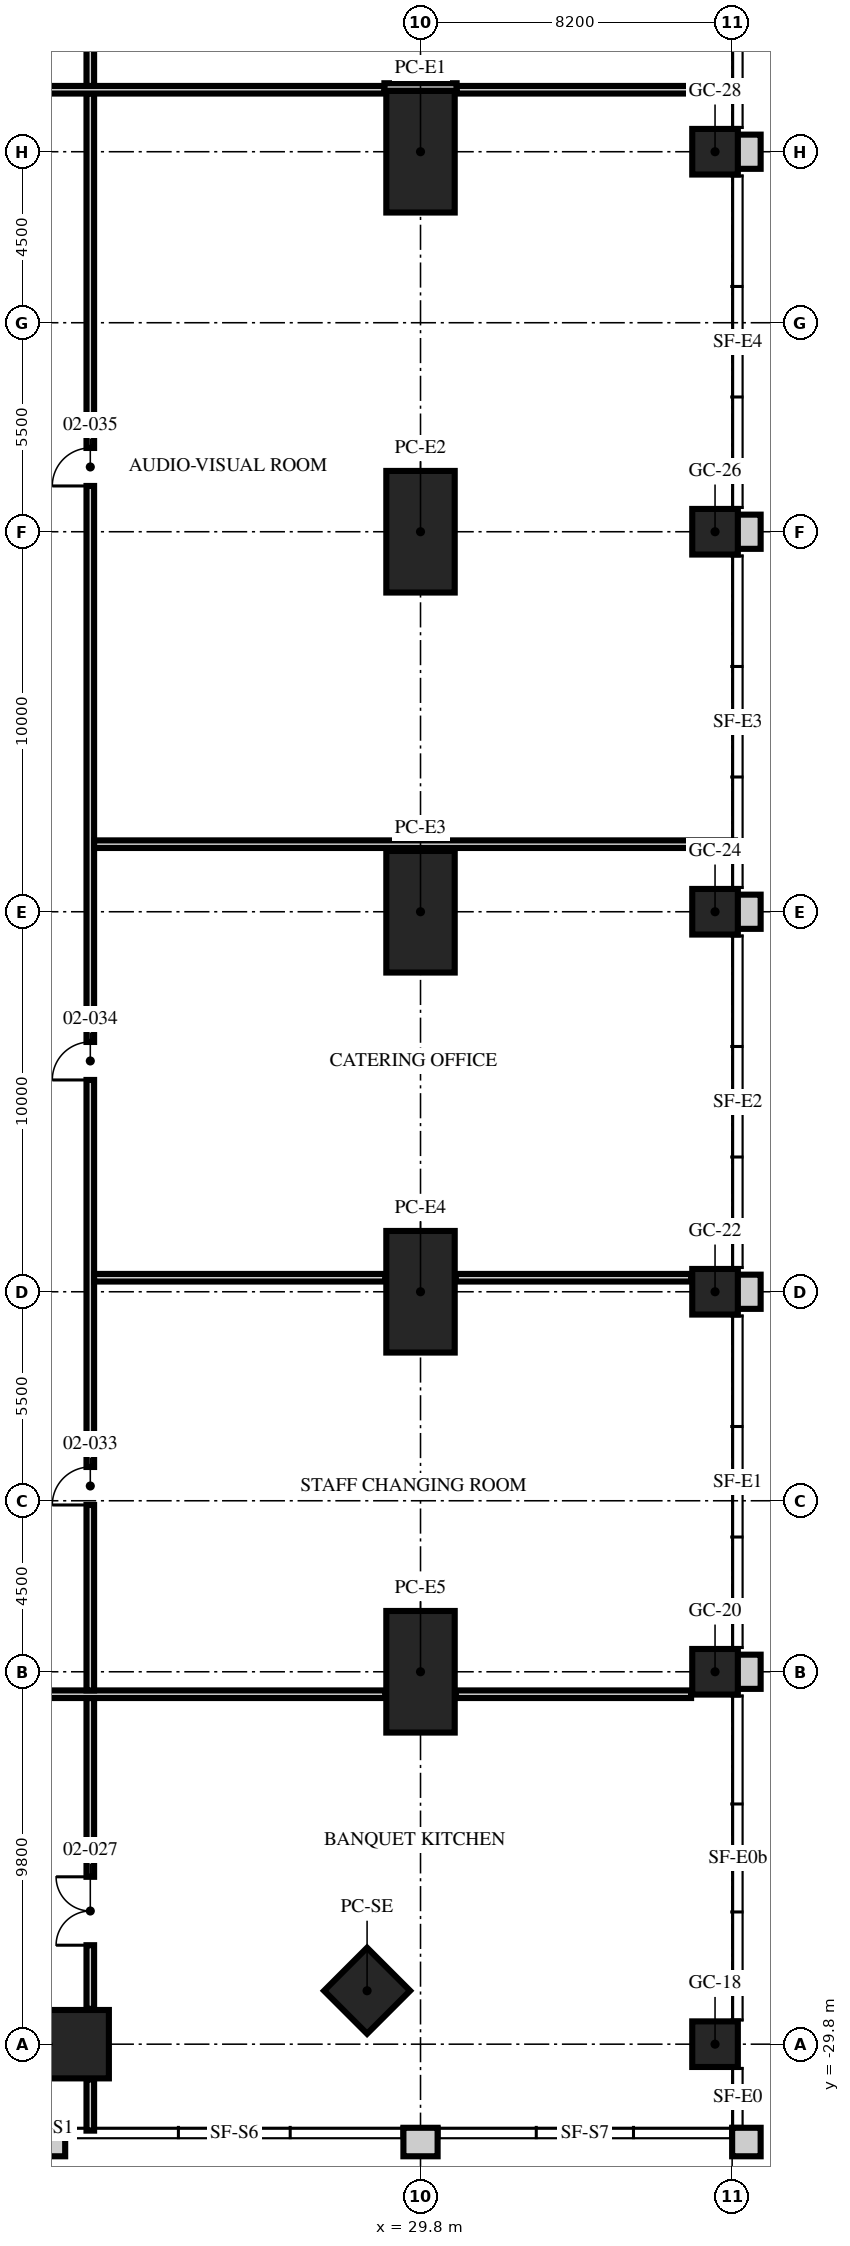
"""IFC4 building model, lengths in metres.
Left out: names, types, materials, properties, quantities, classifications, styles, units other than length and angle.
Written with IfcOpenShell. Run it as: python <this file> out.ifc"""

import sys

from ifc_helpers import new_model, si_unit, direction, frame, frame_2d, origin, origin_2d, place, context, subcontext, project, spatial, rectangle, hollow_rectangle, extrude, element, fill, save


model = new_model("IFC4")
c1 = context("Model", 3, precision=1e-05, world=origin(), true_north=direction((0.0, 1.0)))
c2 = subcontext(c1, "Body", "Model", "MODEL_VIEW")
j1 = project(units=[si_unit("LENGTHUNIT", "METRE"), si_unit("PLANEANGLEUNIT", "RADIAN")], contexts=[c1])
p1 = place(None, origin())
s1 = spatial("IfcSite", under=j1, at=p1, CompositionType="ELEMENT")
p2 = place(p1, origin())
s2 = spatial("IfcBuilding", under=s1, at=p2, CompositionType="ELEMENT")
p3 = place(p2, frame((0.0, 0.0, 11.0)))
s3 = spatial("IfcBuildingStorey", under=s2, at=p3, CompositionType="ELEMENT", Elevation=11.0)
for number, where, z_axis, x_axis in (
    (1, (29.8, 20.0, 0.0), (0.0, 0.0, 1.0), (0.0, 1.0, 0.0)),
    (2, (29.8, 10.0, 0.0), (0.0, 0.0, 1.0), (0.0, 1.0, 0.0)),
    (3, (29.8, 0.0, 0.0), (0.0, 0.0, 1.0), (0.0, 1.0, 0.0)),
    (4, (29.8, -10.0, 0.0), (0.0, 0.0, 1.0), (0.0, 1.0, 0.0)),
    (5, (29.8, -20.0, 0.0), (0.0, 0.0, 1.0), (0.0, 1.0, 0.0)),
    (6, (20.0, -29.8, 0.0), (0.0, 0.0, 1.0), (1.0, 0.0, 0.0)),
):
    element("IfcColumn", number, at=place(p3, frame(where, z_axis=z_axis, x_axis=x_axis)), inside=s3, PredefinedType="COLUMN", context=c2, shape_type="SweptSolid", body=[
        extrude(hollow_rectangle(XDim=3.2, YDim=1.8, WallThickness=0.2, at=origin_2d()), origin(), (0.0, 0.0, 1.0), 5.0),
    ])
p4 = place(p3, frame((28.394, -28.394, 0.0), z_axis=(0.0, 0.0, 1.0), x_axis=(0.707106781187, 0.707106781187, 0.0)))
e7 = element("IfcColumn", 7, at=p4, inside=s3, PredefinedType="COLUMN", context=c2, shape_type="SweptSolid", body=[
    extrude(hollow_rectangle(XDim=1.6, YDim=1.6, WallThickness=0.1, at=origin_2d()), origin(), (0.0, 0.0, 1.0), 5.0),
])
for number, where, z_axis, x_axis in (
    (8, (37.55, -29.8, 0.0), (0.0, 0.0, 1.0), (1.0, 0.0, 0.0)),
    (9, (37.55, -20.0, 0.0), (0.0, 0.0, 1.0), (1.0, 0.0, 0.0)),
    (10, (37.55, -10.0, 0.0), (0.0, 0.0, 1.0), (1.0, 0.0, 0.0)),
    (11, (37.55, 0.0, 0.0), (0.0, 0.0, 1.0), (1.0, 0.0, 0.0)),
    (12, (37.55, 10.0, 0.0), (0.0, 0.0, 1.0), (1.0, 0.0, 0.0)),
    (13, (37.55, 20.0, 0.0), (0.0, 0.0, 1.0), (1.0, 0.0, 0.0)),
):
    element("IfcColumn", number, at=place(p3, frame(where, z_axis=z_axis, x_axis=x_axis)), inside=s3, PredefinedType="COLUMN", context=c2, shape_type="SweptSolid", body=[
        extrude(rectangle(XDim=1.2, YDim=1.2, at=origin_2d()), origin(), (0.0, 0.0, 1.0), 5.0),
    ])
for number, where, z_axis, x_axis in (
    (14, (19.55, -32.375, 0.0), (0.0, 0.0, 1.0), (1.0, 0.0, 0.0)),
    (15, (29.35, -32.375, 0.0), (0.0, 0.0, 1.0), (1.0, 0.0, 0.0)),
):
    element("IfcWall", number, at=place(p3, frame(where, z_axis=z_axis, x_axis=x_axis)), inside=s3, PredefinedType="SOLIDWALL", context=c2, shape_type="SweptSolid", body=[
        extrude(rectangle(XDim=0.9, YDim=0.75, at=frame_2d((0.45, 0.0))), origin(), (0.0, 0.0, 1.0), 5.0),
    ])
p5 = place(p3, frame((38.0, -32.375, 0.0), z_axis=(0.0, 0.0, 1.0), x_axis=(1.0, 0.0, 0.0)))
e16 = element("IfcWall", 16, at=p5, inside=s3, PredefinedType="SOLIDWALL", context=c2, shape_type="SweptSolid", body=[
    extrude(rectangle(XDim=0.75, YDim=0.75, at=frame_2d((0.375, 0.0))), origin(), (0.0, 0.0, 1.0), 5.0),
])
for number, where, z_axis, x_axis in (
    (17, (38.375, -20.45, 0.0), (0.0, 0.0, 1.0), (0.0, 1.0, 0.0)),
    (18, (38.375, -10.45, 0.0), (0.0, 0.0, 1.0), (0.0, 1.0, 0.0)),
    (19, (38.375, -0.45, 0.0), (0.0, 0.0, 1.0), (0.0, 1.0, 0.0)),
    (20, (38.375, 9.55, 0.0), (0.0, 0.0, 1.0), (0.0, 1.0, 0.0)),
    (21, (38.375, 19.55, 0.0), (0.0, 0.0, 1.0), (0.0, 1.0, 0.0)),
):
    element("IfcWall", number, at=place(p3, frame(where, z_axis=z_axis, x_axis=x_axis)), inside=s3, PredefinedType="SOLIDWALL", context=c2, shape_type="SweptSolid", body=[
        extrude(rectangle(XDim=0.9, YDim=0.75, at=frame_2d((0.45, 0.0))), origin(), (0.0, 0.0, 1.0), 5.0),
    ])
p6 = place(p3, frame((21.111, -32.075, 0.0), z_axis=(0.0, 0.0, 1.0), x_axis=(0.0, 1.0, 0.0)))
e22 = element("IfcWall", 22, at=p6, inside=s3, PredefinedType="SOLIDWALL", context=c2, shape_type="SweptSolid", body=[
    extrude(rectangle(XDim=1.345, YDim=0.2, at=frame_2d((0.672, 0.0))), origin(), (0.0, 0.0, 1.0), 4.7),
])
p7 = place(p3, frame((21.111, -28.87, 0.0), z_axis=(0.0, 0.0, 1.0), x_axis=(0.0, 1.0, 0.0)))
e23 = element("IfcWall", 23, at=p7, inside=s3, PredefinedType="SOLIDWALL", context=c2, shape_type="SweptSolid", body=[
    extrude(rectangle(XDim=8.179, YDim=0.2, at=frame_2d((4.089, 0.0))), origin(), (0.0, 0.0, 1.0), 3.5),
])
p8 = place(p7, frame((1.674, 0.0, 0.0)))
e24 = element("IfcOpeningElement", 24, at=p8, cuts=e23, PredefinedType="OPENING", context=c2, shape_type="SweptSolid", body=[
    extrude(rectangle(XDim=1.8, YDim=2.4, at=frame_2d((0.9, 1.2))), frame((0.0, 0.11, 0.0), z_axis=(0.0, -1.0, 0.0), x_axis=(1.0, 0.0, 0.0)), (0.0, 0.0, 1.0), 0.22),
])
p9 = place(p3, frame((-28.87, -20.591, 0.0), z_axis=(0.0, 0.0, 1.0), x_axis=(1.0, 0.0, 0.0)))
e25 = element("IfcWall", 25, at=p9, inside=s3, PredefinedType="SOLIDWALL", context=c2, shape_type="SweptSolid", body=[
    extrude(rectangle(XDim=57.74, YDim=0.2, at=frame_2d((28.87, 0.0))), origin(), (0.0, 0.0, 1.0), 3.5),
])
p10 = place(p9, frame((11.091, 0.0, 0.0)))
e26 = element("IfcOpeningElement", 26, at=p10, cuts=e25, PredefinedType="OPENING", context=c2, shape_type="SweptSolid", body=[
    extrude(rectangle(XDim=1.8, YDim=2.4, at=frame_2d((0.9, 1.2))), frame((0.0, 0.11, 0.0), z_axis=(0.0, -1.0, 0.0), x_axis=(1.0, 0.0, 0.0)), (0.0, 0.0, 1.0), 0.22),
])
p11 = place(p9, frame((32.202, 0.0, 0.0)))
e27 = element("IfcOpeningElement", 27, at=p11, cuts=e25, PredefinedType="OPENING", context=c2, shape_type="SweptSolid", body=[
    extrude(rectangle(XDim=1.8, YDim=2.4, at=frame_2d((0.9, 1.2))), frame((0.0, 0.11, 0.0), z_axis=(0.0, -1.0, 0.0), x_axis=(1.0, 0.0, 0.0)), (0.0, 0.0, 1.0), 0.22),
])
p12 = place(p3, frame((30.73, -20.591, 0.0), z_axis=(0.0, 0.0, 1.0), x_axis=(1.0, 0.0, 0.0)))
e28 = element("IfcWall", 28, at=p12, inside=s3, PredefinedType="SOLIDWALL", context=c2, shape_type="SweptSolid", body=[
    extrude(rectangle(XDim=6.19, YDim=0.2, at=frame_2d((3.095, 0.0))), origin(), (0.0, 0.0, 1.0), 3.7),
])
p13 = place(p3, frame((21.111, -20.491, 0.0), z_axis=(0.0, 0.0, 1.0), x_axis=(0.0, 1.0, 0.0)))
e29 = element("IfcWall", 29, at=p13, inside=s3, PredefinedType="SOLIDWALL", context=c2, shape_type="SweptSolid", body=[
    extrude(rectangle(XDim=42.022, YDim=0.2, at=frame_2d((21.011, 0.0))), origin(), (0.0, 0.0, 1.0), 3.5),
])
p14 = place(p13, frame((4.88, 0.0, 0.0)))
e30 = element("IfcOpeningElement", 30, at=p14, cuts=e29, PredefinedType="OPENING", context=c2, shape_type="SweptSolid", body=[
    extrude(rectangle(XDim=1.0, YDim=2.1, at=frame_2d((0.5, 1.05))), frame((0.0, 0.11, 0.0), z_axis=(0.0, -1.0, 0.0), x_axis=(1.0, 0.0, 0.0)), (0.0, 0.0, 1.0), 0.22),
])
p15 = place(p13, frame((16.064, 0.0, 0.0)))
e31 = element("IfcOpeningElement", 31, at=p15, cuts=e29, PredefinedType="OPENING", context=c2, shape_type="SweptSolid", body=[
    extrude(rectangle(XDim=1.0, YDim=2.1, at=frame_2d((0.5, 1.05))), frame((0.0, 0.11, 0.0), z_axis=(0.0, -1.0, 0.0), x_axis=(1.0, 0.0, 0.0)), (0.0, 0.0, 1.0), 0.22),
])
p16 = place(p13, frame((31.696, 0.0, 0.0)))
e32 = element("IfcOpeningElement", 32, at=p16, cuts=e29, PredefinedType="OPENING", context=c2, shape_type="SweptSolid", body=[
    extrude(rectangle(XDim=1.0, YDim=2.1, at=frame_2d((0.5, 1.05))), frame((0.0, 0.11, 0.0), z_axis=(0.0, -1.0, 0.0), x_axis=(1.0, 0.0, 0.0)), (0.0, 0.0, 1.0), 0.22),
])
p17 = place(p3, frame((21.211, -9.631, 0.0), z_axis=(0.0, 0.0, 1.0), x_axis=(1.0, 0.0, 0.0)))
e33 = element("IfcWall", 33, at=p17, inside=s3, PredefinedType="SOLIDWALL", context=c2, shape_type="SweptSolid", body=[
    extrude(rectangle(XDim=7.659, YDim=0.2, at=frame_2d((3.83, 0.0))), origin(), (0.0, 0.0, 1.0), 4.7),
])
p18 = place(p3, frame((30.73, -9.631, 0.0), z_axis=(0.0, 0.0, 1.0), x_axis=(1.0, 0.0, 0.0)))
e34 = element("IfcWall", 34, at=p18, inside=s3, PredefinedType="SOLIDWALL", context=c2, shape_type="SweptSolid", body=[
    extrude(rectangle(XDim=6.19, YDim=0.2, at=frame_2d((3.095, 0.0))), origin(), (0.0, 0.0, 1.0), 3.7),
])
p19 = place(p3, frame((21.211, 1.778, 0.0), z_axis=(0.0, 0.0, 1.0), x_axis=(1.0, 0.0, 0.0)))
e35 = element("IfcWall", 35, at=p19, inside=s3, PredefinedType="SOLIDWALL", context=c2, shape_type="SweptSolid", body=[
    extrude(rectangle(XDim=16.864, YDim=0.2, at=frame_2d((8.432, 0.0))), origin(), (0.0, 0.0, 1.0), 3.7),
])
p20 = place(p3, frame((1.9, 21.631, 0.0), z_axis=(0.0, 0.0, 1.0), x_axis=(1.0, 0.0, 0.0)))
e36 = element("IfcWall", 36, at=p20, inside=s3, PredefinedType="SOLIDWALL", context=c2, shape_type="SweptSolid", body=[
    extrude(rectangle(XDim=26.95, YDim=0.2, at=frame_2d((13.475, 0.0))), origin(), (0.0, 0.0, 1.0), 3.5),
])
p21 = place(p20, frame((4.61, 0.0, 0.0)))
e37 = element("IfcOpeningElement", 37, at=p21, cuts=e36, PredefinedType="OPENING", context=c2, shape_type="SweptSolid", body=[
    extrude(rectangle(XDim=1.0, YDim=2.1, at=frame_2d((0.5, 1.05))), frame((0.0, 0.11, 0.0), z_axis=(0.0, -1.0, 0.0), x_axis=(1.0, 0.0, 0.0)), (0.0, 0.0, 1.0), 0.22),
])
p22 = place(p20, frame((14.166, 0.0, 0.0)))
e38 = element("IfcOpeningElement", 38, at=p22, cuts=e36, PredefinedType="OPENING", context=c2, shape_type="SweptSolid", body=[
    extrude(rectangle(XDim=1.0, YDim=2.1, at=frame_2d((0.5, 1.05))), frame((0.0, 0.11, 0.0), z_axis=(0.0, -1.0, 0.0), x_axis=(1.0, 0.0, 0.0)), (0.0, 0.0, 1.0), 0.22),
])
p23 = place(p3, frame((30.75, 21.631, 0.0), z_axis=(0.0, 0.0, 1.0), x_axis=(1.0, 0.0, 0.0)))
e39 = element("IfcWall", 39, at=p23, inside=s3, PredefinedType="SOLIDWALL", context=c2, shape_type="SweptSolid", body=[
    extrude(rectangle(XDim=7.325, YDim=0.2, at=frame_2d((3.663, 0.0))), origin(), (0.0, 0.0, 1.0), 3.7),
])
p24 = place(p3, frame((28.85, 21.702, 0.0), z_axis=(0.0, 0.0, 1.0), x_axis=(1.0, 0.0, 0.0)))
e40 = element("IfcWall", 40, at=p24, inside=s3, PredefinedType="SOLIDWALL", context=c2, shape_type="SweptSolid", body=[
    extrude(rectangle(XDim=1.9, YDim=0.2, at=frame_2d((0.95, 0.0))), origin(), (0.0, 0.0, 1.0), 3.7),
])
p25 = place(p3, frame((21.111, 21.731, 0.0), z_axis=(0.0, 0.0, 1.0), x_axis=(0.0, 1.0, 0.0)))
e41 = element("IfcWall", 41, at=p25, inside=s3, PredefinedType="SOLIDWALL", context=c2, shape_type="SweptSolid", body=[
    extrude(rectangle(XDim=5.28, YDim=0.2, at=frame_2d((2.64, 0.0))), origin(), (0.0, 0.0, 1.0), 4.7),
])
p26 = place(p8, origin())
e42 = element("IfcDoor", 42, at=p26, inside=s3, OperationType="DOUBLE_DOOR_SINGLE_SWING", PredefinedType="DOOR", context=c2, shape_type="SweptSolid", body=[
    extrude(rectangle(XDim=1.8, YDim=2.4, at=frame_2d((0.9, 1.2))), frame((0.0, 0.025, 0.0), z_axis=(0.0, -1.0, 0.0), x_axis=(1.0, 0.0, 0.0)), (0.0, 0.0, 1.0), 0.05),
])
fill(e24, e42)
p27 = place(p14, origin())
e43 = element("IfcDoor", 43, at=p27, inside=s3, OperationType="SINGLE_SWING_LEFT", PredefinedType="DOOR", context=c2, shape_type="SweptSolid", body=[
    extrude(rectangle(XDim=1.0, YDim=2.1, at=frame_2d((0.5, 1.05))), frame((0.0, 0.025, 0.0), z_axis=(0.0, -1.0, 0.0), x_axis=(1.0, 0.0, 0.0)), (0.0, 0.0, 1.0), 0.05),
])
fill(e30, e43)
p28 = place(p15, origin())
e44 = element("IfcDoor", 44, at=p28, inside=s3, OperationType="SINGLE_SWING_LEFT", PredefinedType="DOOR", context=c2, shape_type="SweptSolid", body=[
    extrude(rectangle(XDim=1.0, YDim=2.1, at=frame_2d((0.5, 1.05))), frame((0.0, 0.025, 0.0), z_axis=(0.0, -1.0, 0.0), x_axis=(1.0, 0.0, 0.0)), (0.0, 0.0, 1.0), 0.05),
])
fill(e31, e44)
p29 = place(p16, origin())
e45 = element("IfcDoor", 45, at=p29, inside=s3, OperationType="SINGLE_SWING_LEFT", PredefinedType="DOOR", context=c2, shape_type="SweptSolid", body=[
    extrude(rectangle(XDim=1.0, YDim=2.1, at=frame_2d((0.5, 1.05))), frame((0.0, 0.025, 0.0), z_axis=(0.0, -1.0, 0.0), x_axis=(1.0, 0.0, 0.0)), (0.0, 0.0, 1.0), 0.05),
])
fill(e32, e45)
save(model, sys.argv[1])
